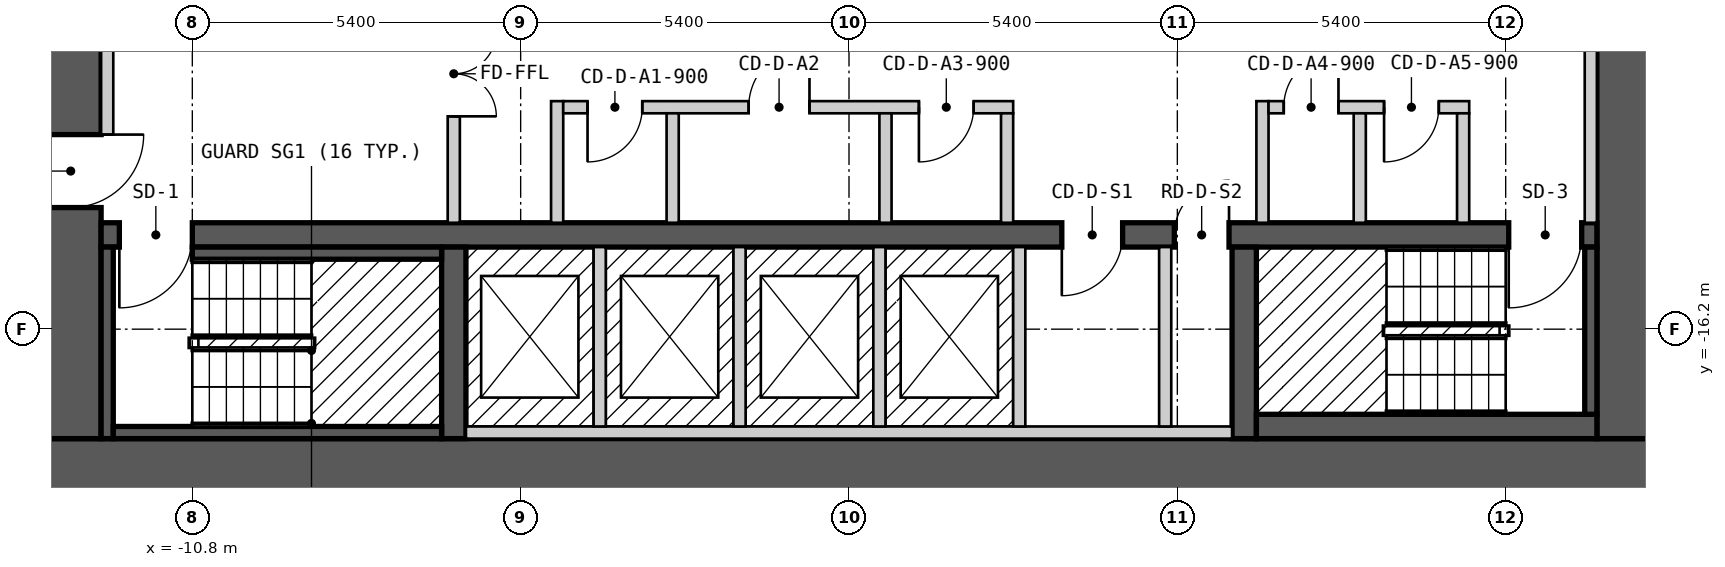
"""IFC4 building model, lengths in metres.
Left out: names, types, materials, properties, quantities, classifications, styles, units other than length and angle.
Written with IfcOpenShell. Run it as: python <this file> out.ifc"""

import sys

from ifc_helpers import new_model, si_unit, direction, frame, frame_2d, origin, place, context, subcontext, project, spatial, rectangle, extrude, element, fill, save


model = new_model("IFC4")
c1 = context("Model", 3, precision=1e-05, world=origin(), true_north=direction((0.0, 1.0)))
c2 = subcontext(c1, "Body", "Model", "MODEL_VIEW")
j1 = project(units=[si_unit("LENGTHUNIT", "METRE"), si_unit("PLANEANGLEUNIT", "RADIAN")], contexts=[c1])
p1 = place(None, origin())
s1 = spatial("IfcSite", under=j1, at=p1, CompositionType="ELEMENT")
p2 = place(p1, origin())
s2 = spatial("IfcBuilding", under=s1, at=p2, CompositionType="ELEMENT")
p3 = place(p2, frame((0.0, 0.0, 90.0)))
s3 = spatial("IfcBuildingStorey", under=s2, at=p3, CompositionType="ELEMENT", Elevation=90.0)
p4 = place(p3, frame((-13.3, -18.5, 0.0), z_axis=(0.0, 0.0, 1.0), x_axis=(1.0, 0.0, 0.0)))
e1 = element("IfcWall", 1, at=p4, inside=s3, PredefinedType="SHEAR", context=c2, shape_type="SweptSolid", body=[
    extrude(rectangle(XDim=26.6, YDim=1.0, at=frame_2d((13.3, 0.0))), origin(), (0.0, 0.0, 1.0), 2.7),
])
p5 = place(p3, frame((-12.8, -18.0, 0.0), z_axis=(0.0, 0.0, 1.0), x_axis=(0.0, 1.0, 0.0)))
e2 = element("IfcWall", 2, at=p5, inside=s3, PredefinedType="SHEAR", context=c2, shape_type="SweptSolid", body=[
    extrude(rectangle(XDim=12.0, YDim=1.0, at=frame_2d((6.0, 0.0))), origin(), (0.0, 0.0, 1.0), 2.7),
])
p6 = place(p5, frame((3.8, 0.0, 0.0)))
e3 = element("IfcOpeningElement", 3, at=p6, cuts=e2, PredefinedType="OPENING", context=c2, shape_type="SweptSolid", body=[
    extrude(rectangle(XDim=1.2, YDim=2.1, at=frame_2d((0.6, 1.05))), frame((0.0, 0.51, 0.0), z_axis=(0.0, -1.0, 0.0), x_axis=(1.0, 0.0, 0.0)), (0.0, 0.0, 1.0), 1.02),
])
p7 = place(p3, frame((12.8, -18.0, 0.0), z_axis=(0.0, 0.0, 1.0), x_axis=(0.0, 1.0, 0.0)))
e4 = element("IfcWall", 4, at=p7, inside=s3, PredefinedType="SHEAR", context=c2, shape_type="SweptSolid", body=[
    extrude(rectangle(XDim=12.0, YDim=1.0, at=frame_2d((6.0, 0.0))), origin(), (0.0, 0.0, 1.0), 2.7),
])
p8 = place(p3, frame((-12.3, -14.65, 0.0), z_axis=(0.0, 0.0, 1.0), x_axis=(1.0, 0.0, 0.0)))
e5 = element("IfcWall", 5, at=p8, inside=s3, PredefinedType="SHEAR", context=c2, shape_type="SweptSolid", body=[
    extrude(rectangle(XDim=24.6, YDim=0.4, at=frame_2d((12.3, 0.0))), origin(), (0.0, 0.0, 1.0), 2.7),
])
p9 = place(p8, frame((1.5, 0.0, 0.0), z_axis=(0.0, 0.0, 1.0), x_axis=(-1.0, 0.0, 0.0)))
e6 = element("IfcOpeningElement", 6, at=p9, cuts=e5, PredefinedType="OPENING", context=c2, shape_type="SweptSolid", body=[
    extrude(rectangle(XDim=1.2, YDim=2.1, at=frame_2d((0.6, 1.05))), frame((0.0, 0.21, 0.0), z_axis=(0.0, -1.0, 0.0), x_axis=(1.0, 0.0, 0.0)), (0.0, 0.0, 1.0), 0.42),
])
p10 = place(p8, frame((24.35, 0.0, 0.0), z_axis=(0.0, 0.0, 1.0), x_axis=(-1.0, 0.0, 0.0)))
e7 = element("IfcOpeningElement", 7, at=p10, cuts=e5, PredefinedType="OPENING", context=c2, shape_type="SweptSolid", body=[
    extrude(rectangle(XDim=1.2, YDim=2.1, at=frame_2d((0.6, 1.05))), frame((0.0, 0.21, 0.0), z_axis=(0.0, -1.0, 0.0), x_axis=(1.0, 0.0, 0.0)), (0.0, 0.0, 1.0), 0.42),
])
p11 = place(p8, frame((16.8, 0.0, 0.0), z_axis=(0.0, 0.0, 1.0), x_axis=(-1.0, 0.0, 0.0)))
e8 = element("IfcOpeningElement", 8, at=p11, cuts=e5, PredefinedType="OPENING", context=c2, shape_type="SweptSolid", body=[
    extrude(rectangle(XDim=1.0, YDim=2.1, at=frame_2d((0.5, 1.05))), frame((0.0, 0.21, 0.0), z_axis=(0.0, -1.0, 0.0), x_axis=(1.0, 0.0, 0.0)), (0.0, 0.0, 1.0), 0.42),
])
p12 = place(p8, frame((18.55, 0.0, 0.0), z_axis=(0.0, 0.0, 1.0), x_axis=(-1.0, 0.0, 0.0)))
e9 = element("IfcOpeningElement", 9, at=p12, cuts=e5, PredefinedType="OPENING", context=c2, shape_type="SweptSolid", body=[
    extrude(rectangle(XDim=0.9, YDim=2.1, at=frame_2d((0.45, 1.05))), frame((0.0, 0.21, 0.0), z_axis=(0.0, -1.0, 0.0), x_axis=(1.0, 0.0, 0.0)), (0.0, 0.0, 1.0), 0.42),
])
for number, where, z_axis, x_axis in (
    (10, (-6.5, -18.0, 0.0), (0.0, 0.0, 1.0), (0.0, 1.0, 0.0)),
    (11, (6.5, -18.0, 0.0), (0.0, 0.0, 1.0), (0.0, 1.0, 0.0)),
):
    element("IfcWall", number, at=place(p3, frame(where, z_axis=z_axis, x_axis=x_axis)), inside=s3, PredefinedType="SHEAR", context=c2, shape_type="SweptSolid", body=[
        extrude(rectangle(XDim=3.15, YDim=0.4, at=frame_2d((1.575, 0.0))), origin(), (0.0, 0.0, 1.0), 2.7),
    ])
p13 = place(p3, frame((-12.2, -18.0, 0.0), z_axis=(0.0, 0.0, 1.0), x_axis=(0.0, 1.0, 0.0)))
e12 = element("IfcWall", 12, at=p13, inside=s3, PredefinedType="SOLIDWALL", context=c2, shape_type="SweptSolid", body=[
    extrude(rectangle(XDim=3.15, YDim=0.2, at=frame_2d((1.575, 0.0))), origin(), (0.0, 0.0, 1.0), 2.7),
])
p14 = place(p3, frame((-12.2, -13.0, 0.0), z_axis=(0.0, 0.0, 1.0), x_axis=(0.0, 1.0, 0.0)))
e13 = element("IfcWall", 13, at=p14, inside=s3, PredefinedType="PARTITIONING", context=c2, shape_type="SweptSolid", body=[
    extrude(rectangle(XDim=3.45, YDim=0.2, at=frame_2d((1.725, 0.0))), origin(), (0.0, 0.0, 1.0), 2.7),
])
p15 = place(p3, frame((-12.1, -17.9, 0.0), z_axis=(0.0, 0.0, 1.0), x_axis=(1.0, 0.0, 0.0)))
e14 = element("IfcWall", 14, at=p15, inside=s3, PredefinedType="SOLIDWALL", context=c2, shape_type="SweptSolid", body=[
    extrude(rectangle(XDim=5.4, YDim=0.2, at=frame_2d((2.7, 0.0))), origin(), (0.0, 0.0, 1.0), 2.7),
])
p16 = place(p3, frame((-10.8, -14.95, 0.0), z_axis=(0.0, 0.0, 1.0), x_axis=(1.0, 0.0, 0.0)))
e15 = element("IfcWall", 15, at=p16, inside=s3, PredefinedType="SOLIDWALL", context=c2, shape_type="SweptSolid", body=[
    extrude(rectangle(XDim=4.1, YDim=0.2, at=frame_2d((2.05, 0.0))), origin(), (0.0, 0.0, 1.0), 2.7),
])
p17 = place(p3, frame((-6.5, -14.45, 0.0), z_axis=(0.0, 0.0, 1.0), x_axis=(0.0, 1.0, 0.0)))
e16 = element("IfcWall", 16, at=p17, inside=s3, PredefinedType="PARTITIONING", context=c2, shape_type="SweptSolid", body=[
    extrude(rectangle(XDim=4.9, YDim=0.2, at=frame_2d((2.45, 0.0))), origin(), (0.0, 0.0, 1.0), 2.7),
])
p18 = place(p17, frame((3.15, 0.0, 0.0), z_axis=(0.0, 0.0, 1.0), x_axis=(-1.0, 0.0, 0.0)))
e17 = element("IfcOpeningElement", 17, at=p18, cuts=e16, PredefinedType="OPENING", context=c2, shape_type="SweptSolid", body=[
    extrude(rectangle(XDim=1.4, YDim=2.1, at=frame_2d((0.7, 1.05))), frame((0.0, 0.11, 0.0), z_axis=(0.0, -1.0, 0.0), x_axis=(1.0, 0.0, 0.0)), (0.0, 0.0, 1.0), 0.22),
])
p19 = place(p3, frame((-6.3, -17.9, 0.0), z_axis=(0.0, 0.0, 1.0), x_axis=(1.0, 0.0, 0.0)))
e18 = element("IfcWall", 18, at=p19, inside=s3, PredefinedType="SOLIDWALL", context=c2, shape_type="SweptSolid", body=[
    extrude(rectangle(XDim=12.6, YDim=0.2, at=frame_2d((6.3, 0.0))), origin(), (0.0, 0.0, 1.0), 2.7),
])
p20 = place(p3, frame((-4.8, -14.45, 0.0), z_axis=(0.0, 0.0, 1.0), x_axis=(0.0, 1.0, 0.0)))
e19 = element("IfcWall", 19, at=p20, inside=s3, PredefinedType="PARTITIONING", context=c2, shape_type="SweptSolid", body=[
    extrude(rectangle(XDim=2.0, YDim=0.2, at=frame_2d((1.0, 0.0))), origin(), (0.0, 0.0, 1.0), 2.7),
])
p21 = place(p3, frame((-4.7, -12.55, 0.0), z_axis=(0.0, 0.0, 1.0), x_axis=(1.0, 0.0, 0.0)))
e20 = element("IfcWall", 20, at=p21, inside=s3, PredefinedType="PARTITIONING", context=c2, shape_type="SweptSolid", body=[
    extrude(rectangle(XDim=7.4, YDim=0.2, at=frame_2d((3.7, 0.0))), origin(), (0.0, 0.0, 1.0), 2.7),
])
p22 = place(p21, frame((1.3, 0.0, 0.0), z_axis=(0.0, 0.0, 1.0), x_axis=(-1.0, 0.0, 0.0)))
e21 = element("IfcOpeningElement", 21, at=p22, cuts=e20, PredefinedType="OPENING", context=c2, shape_type="SweptSolid", body=[
    extrude(rectangle(XDim=0.9, YDim=2.1, at=frame_2d((0.45, 1.05))), frame((0.0, 0.11, 0.0), z_axis=(0.0, -1.0, 0.0), x_axis=(1.0, 0.0, 0.0)), (0.0, 0.0, 1.0), 0.22),
])
p23 = place(p21, frame((4.05, 0.0, 0.0), z_axis=(0.0, 0.0, 1.0), x_axis=(-1.0, 0.0, 0.0)))
e22 = element("IfcOpeningElement", 22, at=p23, cuts=e20, PredefinedType="OPENING", context=c2, shape_type="SweptSolid", body=[
    extrude(rectangle(XDim=1.0, YDim=2.1, at=frame_2d((0.5, 1.05))), frame((0.0, 0.11, 0.0), z_axis=(0.0, -1.0, 0.0), x_axis=(1.0, 0.0, 0.0)), (0.0, 0.0, 1.0), 0.22),
])
p24 = place(p21, frame((6.75, 0.0, 0.0), z_axis=(0.0, 0.0, 1.0), x_axis=(-1.0, 0.0, 0.0)))
e23 = element("IfcOpeningElement", 23, at=p24, cuts=e20, PredefinedType="OPENING", context=c2, shape_type="SweptSolid", body=[
    extrude(rectangle(XDim=0.9, YDim=2.1, at=frame_2d((0.45, 1.05))), frame((0.0, 0.11, 0.0), z_axis=(0.0, -1.0, 0.0), x_axis=(1.0, 0.0, 0.0)), (0.0, 0.0, 1.0), 0.22),
])
p25 = place(p3, frame((-4.1, -17.8, 0.0), z_axis=(0.0, 0.0, 1.0), x_axis=(0.0, 1.0, 0.0)))
e24 = element("IfcWall", 24, at=p25, inside=s3, PredefinedType="SOLIDWALL", context=c2, shape_type="SweptSolid", body=[
    extrude(rectangle(XDim=2.95, YDim=0.2, at=frame_2d((1.475, 0.0))), origin(), (0.0, 0.0, 1.0), 2.7),
])
p26 = place(p3, frame((-2.9, -14.45, 0.0), z_axis=(0.0, 0.0, 1.0), x_axis=(0.0, 1.0, 0.0)))
e25 = element("IfcWall", 25, at=p26, inside=s3, PredefinedType="PARTITIONING", context=c2, shape_type="SweptSolid", body=[
    extrude(rectangle(XDim=1.8, YDim=0.2, at=frame_2d((0.9, 0.0))), origin(), (0.0, 0.0, 1.0), 2.7),
])
for number, where, z_axis, x_axis in (
    (26, (-1.8, -17.8, 0.0), (0.0, 0.0, 1.0), (0.0, 1.0, 0.0)),
    (27, (0.5, -17.8, 0.0), (0.0, 0.0, 1.0), (0.0, 1.0, 0.0)),
):
    element("IfcWall", number, at=place(p3, frame(where, z_axis=z_axis, x_axis=x_axis)), inside=s3, PredefinedType="SOLIDWALL", context=c2, shape_type="SweptSolid", body=[
        extrude(rectangle(XDim=2.95, YDim=0.2, at=frame_2d((1.475, 0.0))), origin(), (0.0, 0.0, 1.0), 2.7),
    ])
for number, where, z_axis, x_axis in (
    (28, (0.6, -14.45, 0.0), (0.0, 0.0, 1.0), (0.0, 1.0, 0.0)),
    (29, (2.6, -14.45, 0.0), (0.0, 0.0, 1.0), (0.0, 1.0, 0.0)),
):
    element("IfcWall", number, at=place(p3, frame(where, z_axis=z_axis, x_axis=x_axis)), inside=s3, PredefinedType="PARTITIONING", context=c2, shape_type="SweptSolid", body=[
        extrude(rectangle(XDim=1.8, YDim=0.2, at=frame_2d((0.9, 0.0))), origin(), (0.0, 0.0, 1.0), 2.7),
    ])
p27 = place(p3, frame((2.8, -17.8, 0.0), z_axis=(0.0, 0.0, 1.0), x_axis=(0.0, 1.0, 0.0)))
e30 = element("IfcWall", 30, at=p27, inside=s3, PredefinedType="SOLIDWALL", context=c2, shape_type="SweptSolid", body=[
    extrude(rectangle(XDim=2.95, YDim=0.2, at=frame_2d((1.475, 0.0))), origin(), (0.0, 0.0, 1.0), 2.7),
])
p28 = place(p3, frame((5.2, -17.8, 0.0), z_axis=(0.0, 0.0, 1.0), x_axis=(0.0, 1.0, 0.0)))
e31 = element("IfcWall", 31, at=p28, inside=s3, PredefinedType="PARTITIONING", context=c2, shape_type="SweptSolid", body=[
    extrude(rectangle(XDim=2.95, YDim=0.2, at=frame_2d((1.475, 0.0))), origin(), (0.0, 0.0, 1.0), 2.7),
])
p29 = place(p3, frame((6.7, -17.8, 0.0), z_axis=(0.0, 0.0, 1.0), x_axis=(1.0, 0.0, 0.0)))
e32 = element("IfcWall", 32, at=p29, inside=s3, PredefinedType="SOLIDWALL", context=c2, shape_type="SweptSolid", body=[
    extrude(rectangle(XDim=5.6, YDim=0.4, at=frame_2d((2.8, 0.0))), origin(), (0.0, 0.0, 1.0), 2.7),
])
p30 = place(p3, frame((6.8, -14.45, 0.0), z_axis=(0.0, 0.0, 1.0), x_axis=(0.0, 1.0, 0.0)))
e33 = element("IfcWall", 33, at=p30, inside=s3, PredefinedType="PARTITIONING", context=c2, shape_type="SweptSolid", body=[
    extrude(rectangle(XDim=2.0, YDim=0.2, at=frame_2d((1.0, 0.0))), origin(), (0.0, 0.0, 1.0), 2.7),
])
p31 = place(p3, frame((6.9, -12.55, 0.0), z_axis=(0.0, 0.0, 1.0), x_axis=(1.0, 0.0, 0.0)))
e34 = element("IfcWall", 34, at=p31, inside=s3, PredefinedType="PARTITIONING", context=c2, shape_type="SweptSolid", body=[
    extrude(rectangle(XDim=3.3, YDim=0.2, at=frame_2d((1.65, 0.0))), origin(), (0.0, 0.0, 1.0), 2.7),
])
p32 = place(p31, frame((1.15, 0.0, 0.0), z_axis=(0.0, 0.0, 1.0), x_axis=(-1.0, 0.0, 0.0)))
e35 = element("IfcOpeningElement", 35, at=p32, cuts=e34, PredefinedType="OPENING", context=c2, shape_type="SweptSolid", body=[
    extrude(rectangle(XDim=0.9, YDim=2.1, at=frame_2d((0.45, 1.05))), frame((0.0, 0.11, 0.0), z_axis=(0.0, -1.0, 0.0), x_axis=(1.0, 0.0, 0.0)), (0.0, 0.0, 1.0), 0.22),
])
p33 = place(p31, frame((2.8, 0.0, 0.0), z_axis=(0.0, 0.0, 1.0), x_axis=(-1.0, 0.0, 0.0)))
e36 = element("IfcOpeningElement", 36, at=p33, cuts=e34, PredefinedType="OPENING", context=c2, shape_type="SweptSolid", body=[
    extrude(rectangle(XDim=0.9, YDim=2.1, at=frame_2d((0.45, 1.05))), frame((0.0, 0.11, 0.0), z_axis=(0.0, -1.0, 0.0), x_axis=(1.0, 0.0, 0.0)), (0.0, 0.0, 1.0), 0.22),
])
for number, where, z_axis, x_axis in (
    (37, (8.4, -14.45, 0.0), (0.0, 0.0, 1.0), (0.0, 1.0, 0.0)),
    (38, (10.1, -14.45, 0.0), (0.0, 0.0, 1.0), (0.0, 1.0, 0.0)),
):
    element("IfcWall", number, at=place(p3, frame(where, z_axis=z_axis, x_axis=x_axis)), inside=s3, PredefinedType="PARTITIONING", context=c2, shape_type="SweptSolid", body=[
        extrude(rectangle(XDim=1.8, YDim=0.2, at=frame_2d((0.9, 0.0))), origin(), (0.0, 0.0, 1.0), 2.7),
    ])
p34 = place(p3, frame((12.2, -17.6, 0.0), z_axis=(0.0, 0.0, 1.0), x_axis=(0.0, 1.0, 0.0)))
e39 = element("IfcWall", 39, at=p34, inside=s3, PredefinedType="SOLIDWALL", context=c2, shape_type="SweptSolid", body=[
    extrude(rectangle(XDim=2.75, YDim=0.2, at=frame_2d((1.375, 0.0))), origin(), (0.0, 0.0, 1.0), 2.7),
])
p35 = place(p3, frame((12.2, -14.45, 0.0), z_axis=(0.0, 0.0, 1.0), x_axis=(0.0, 1.0, 0.0)))
e40 = element("IfcWall", 40, at=p35, inside=s3, PredefinedType="PARTITIONING", context=c2, shape_type="SweptSolid", body=[
    extrude(rectangle(XDim=8.25, YDim=0.2, at=frame_2d((4.125, 0.0))), origin(), (0.0, 0.0, 1.0), 2.7),
])
p36 = place(p9, origin())
e41 = element("IfcDoor", 41, at=p36, inside=s3, OperationType="SINGLE_SWING_RIGHT", PredefinedType="DOOR", context=c2, shape_type="SweptSolid", body=[
    extrude(rectangle(XDim=1.2, YDim=2.1, at=frame_2d((0.6, 1.05))), frame((0.0, 0.025, 0.0), z_axis=(0.0, -1.0, 0.0), x_axis=(1.0, 0.0, 0.0)), (0.0, 0.0, 1.0), 0.05),
])
fill(e6, e41)
p37 = place(p10, origin())
e42 = element("IfcDoor", 42, at=p37, inside=s3, OperationType="SINGLE_SWING_RIGHT", PredefinedType="DOOR", context=c2, shape_type="SweptSolid", body=[
    extrude(rectangle(XDim=1.2, YDim=2.1, at=frame_2d((0.6, 1.05))), frame((0.0, 0.025, 0.0), z_axis=(0.0, -1.0, 0.0), x_axis=(1.0, 0.0, 0.0)), (0.0, 0.0, 1.0), 0.05),
])
fill(e7, e42)
p38 = place(p6, origin())
e43 = element("IfcDoor", 43, at=p38, inside=s3, OperationType="SINGLE_SWING_RIGHT", PredefinedType="DOOR", context=c2, shape_type="SweptSolid", body=[
    extrude(rectangle(XDim=1.2, YDim=2.1, at=frame_2d((0.6, 1.05))), frame((0.0, 0.025, 0.0), z_axis=(0.0, -1.0, 0.0), x_axis=(1.0, 0.0, 0.0)), (0.0, 0.0, 1.0), 0.05),
])
fill(e3, e43)
p39 = place(p18, origin())
e44 = element("IfcDoor", 44, at=p39, inside=s3, OperationType="DOUBLE_DOOR_SINGLE_SWING", PredefinedType="DOOR", context=c2, shape_type="SweptSolid", body=[
    extrude(rectangle(XDim=1.4, YDim=2.1, at=frame_2d((0.7, 1.05))), frame((0.0, 0.025, 0.0), z_axis=(0.0, -1.0, 0.0), x_axis=(1.0, 0.0, 0.0)), (0.0, 0.0, 1.0), 0.05),
])
fill(e17, e44)
p40 = place(p22, origin())
e45 = element("IfcDoor", 45, at=p40, inside=s3, OperationType="SINGLE_SWING_RIGHT", PredefinedType="DOOR", context=c2, shape_type="SweptSolid", body=[
    extrude(rectangle(XDim=0.9, YDim=2.1, at=frame_2d((0.45, 1.05))), frame((0.0, 0.025, 0.0), z_axis=(0.0, -1.0, 0.0), x_axis=(1.0, 0.0, 0.0)), (0.0, 0.0, 1.0), 0.05),
])
fill(e21, e45)
p41 = place(p23, origin())
e46 = element("IfcDoor", 46, at=p41, inside=s3, OperationType="SINGLE_SWING_LEFT", PredefinedType="DOOR", context=c2, shape_type="SweptSolid", body=[
    extrude(rectangle(XDim=1.0, YDim=2.1, at=frame_2d((0.5, 1.05))), frame((0.0, 0.025, 0.0), z_axis=(0.0, -1.0, 0.0), x_axis=(1.0, 0.0, 0.0)), (0.0, 0.0, 1.0), 0.05),
])
fill(e22, e46)
p42 = place(p24, origin())
e47 = element("IfcDoor", 47, at=p42, inside=s3, OperationType="SINGLE_SWING_RIGHT", PredefinedType="DOOR", context=c2, shape_type="SweptSolid", body=[
    extrude(rectangle(XDim=0.9, YDim=2.1, at=frame_2d((0.45, 1.05))), frame((0.0, 0.025, 0.0), z_axis=(0.0, -1.0, 0.0), x_axis=(1.0, 0.0, 0.0)), (0.0, 0.0, 1.0), 0.05),
])
fill(e23, e47)
p43 = place(p32, origin())
e48 = element("IfcDoor", 48, at=p43, inside=s3, OperationType="SINGLE_SWING_LEFT", PredefinedType="DOOR", context=c2, shape_type="SweptSolid", body=[
    extrude(rectangle(XDim=0.9, YDim=2.1, at=frame_2d((0.45, 1.05))), frame((0.0, 0.025, 0.0), z_axis=(0.0, -1.0, 0.0), x_axis=(1.0, 0.0, 0.0)), (0.0, 0.0, 1.0), 0.05),
])
fill(e35, e48)
p44 = place(p33, origin())
e49 = element("IfcDoor", 49, at=p44, inside=s3, OperationType="SINGLE_SWING_RIGHT", PredefinedType="DOOR", context=c2, shape_type="SweptSolid", body=[
    extrude(rectangle(XDim=0.9, YDim=2.1, at=frame_2d((0.45, 1.05))), frame((0.0, 0.025, 0.0), z_axis=(0.0, -1.0, 0.0), x_axis=(1.0, 0.0, 0.0)), (0.0, 0.0, 1.0), 0.05),
])
fill(e36, e49)
p45 = place(p11, origin())
e50 = element("IfcDoor", 50, at=p45, inside=s3, OperationType="SINGLE_SWING_RIGHT", PredefinedType="DOOR", context=c2, shape_type="SweptSolid", body=[
    extrude(rectangle(XDim=1.0, YDim=2.1, at=frame_2d((0.5, 1.05))), frame((0.0, 0.025, 0.0), z_axis=(0.0, -1.0, 0.0), x_axis=(1.0, 0.0, 0.0)), (0.0, 0.0, 1.0), 0.05),
])
fill(e8, e50)
p46 = place(p12, origin())
e51 = element("IfcDoor", 51, at=p46, inside=s3, OperationType="SINGLE_SWING_LEFT", PredefinedType="DOOR", context=c2, shape_type="SweptSolid", body=[
    extrude(rectangle(XDim=0.9, YDim=2.1, at=frame_2d((0.45, 1.05))), frame((0.0, 0.025, 0.0), z_axis=(0.0, -1.0, 0.0), x_axis=(1.0, 0.0, 0.0)), (0.0, 0.0, 1.0), 0.05),
])
fill(e9, e51)
save(model, sys.argv[1])
